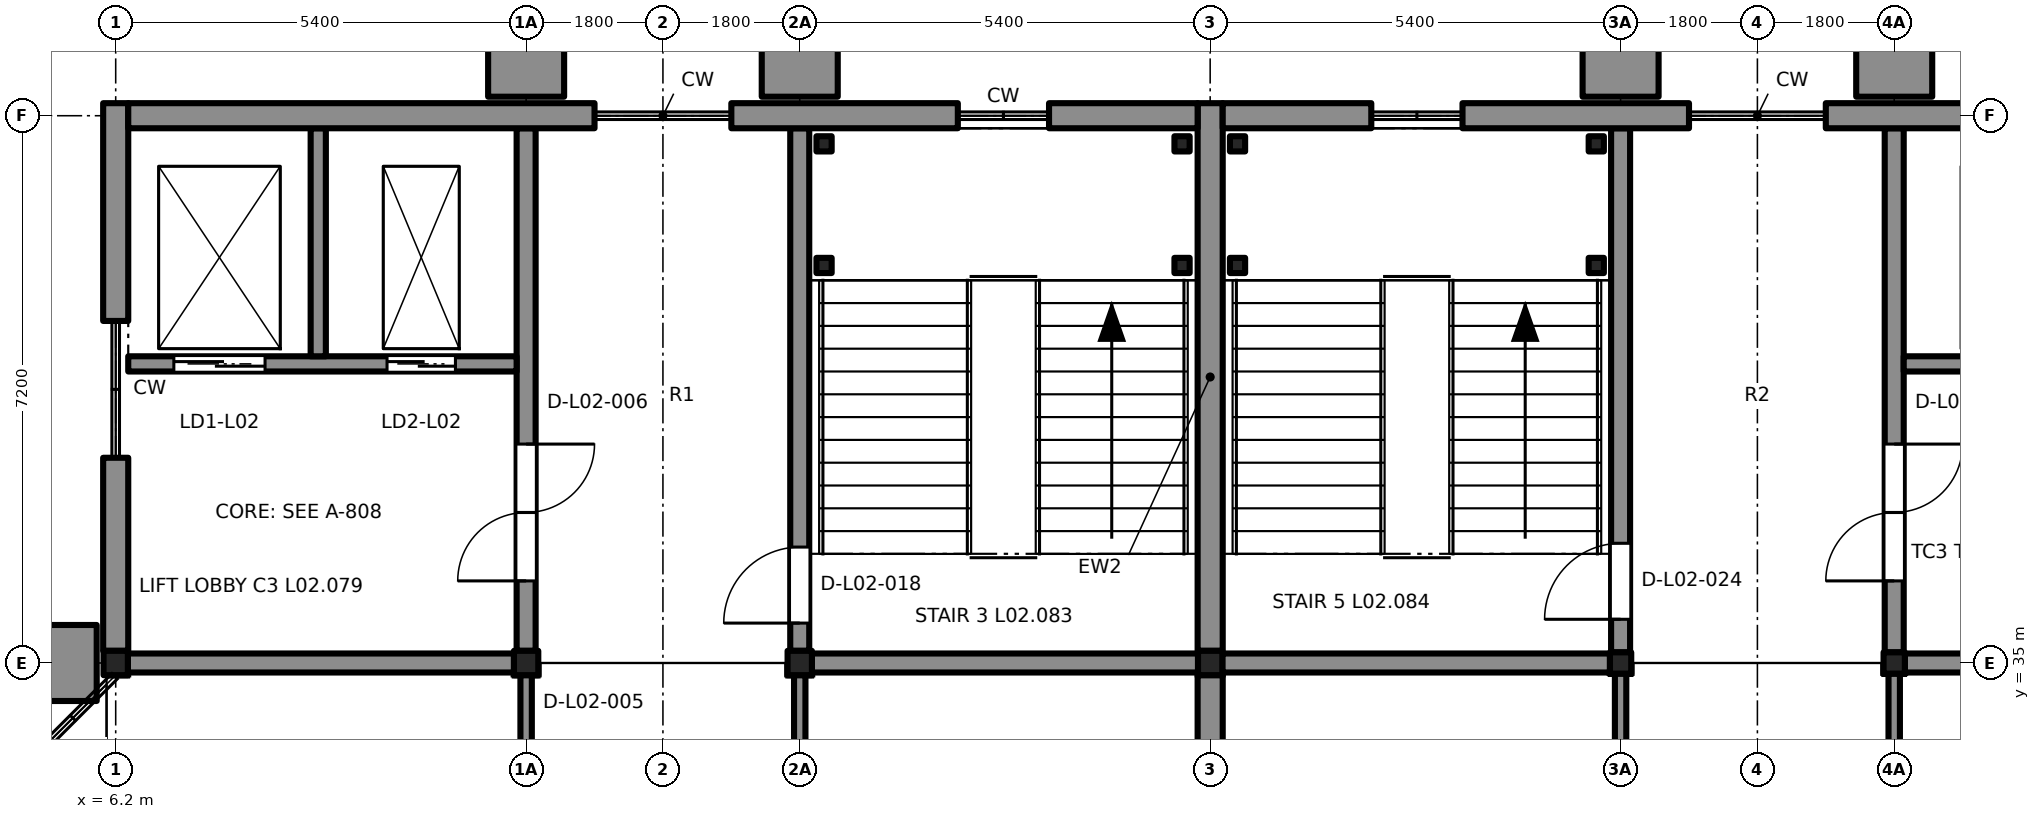
"""IFC4 building model, lengths in metres.
Left out: names, types, materials, properties, quantities, classifications, styles, units other than length and angle.
Written with IfcOpenShell. Run it as: python <this file> out.ifc"""

import sys

from ifc_helpers import new_model, si_unit, direction, frame, frame_2d, origin, origin_2d, place, context, subcontext, project, spatial, rectangle, extrude, element, fill, save


model = new_model("IFC4")
c1 = context("Model", 3, precision=1e-05, world=origin(), true_north=direction((0.0, 1.0)))
c2 = subcontext(c1, "Body", "Model", "MODEL_VIEW")
j1 = project(units=[si_unit("LENGTHUNIT", "METRE"), si_unit("PLANEANGLEUNIT", "RADIAN")], contexts=[c1])
p1 = place(None, origin())
s1 = spatial("IfcSite", under=j1, at=p1, CompositionType="ELEMENT")
p2 = place(p1, origin())
s2 = spatial("IfcBuilding", under=s1, at=p2, CompositionType="ELEMENT")
p3 = place(p2, frame((0.0, 0.0, 10.2)))
s3 = spatial("IfcBuildingStorey", under=s2, at=p3, CompositionType="ELEMENT", Elevation=10.2)
for number, where, z_axis, x_axis in (
    (1, (6.2, 35.0, 0.0), (0.0, 0.0, 1.0), (1.0, 0.0, 0.0)),
    (2, (11.6, 35.0, 0.0), (0.0, 0.0, 1.0), (1.0, 0.0, 0.0)),
    (3, (15.2, 35.0, 0.0), (0.0, 0.0, 1.0), (1.0, 0.0, 0.0)),
    (4, (20.6, 35.0, 0.0), (0.0, 0.0, 1.0), (1.0, 0.0, 0.0)),
):
    element("IfcColumn", number, at=place(p3, frame(where, z_axis=z_axis, x_axis=x_axis)), inside=s3, PredefinedType="COLUMN", context=c2, shape_type="SweptSolid", body=[
        extrude(rectangle(XDim=0.32, YDim=0.32, at=origin_2d()), origin(), (0.0, 0.0, 1.0), 3.9),
    ])
for number, where, z_axis, x_axis in (
    (5, (26.0, 35.0, 0.0), (0.0, 0.0, 1.0), (1.0, 0.0, 0.0)),
    (6, (29.6, 35.0, 0.0), (0.0, 0.0, 1.0), (1.0, 0.0, 0.0)),
):
    element("IfcColumn", number, at=place(p3, frame(where, z_axis=z_axis, x_axis=x_axis)), inside=s3, PredefinedType="COLUMN", context=c2, shape_type="SweptSolid", body=[
        extrude(rectangle(XDim=0.28, YDim=0.28, at=origin_2d()), origin(), (0.0, 0.0, 1.0), 3.9),
    ])
p4 = place(p3, frame((15.2, 35.16, 0.0), z_axis=(0.0, 0.0, 1.0), x_axis=(0.0, 1.0, 0.0)))
e7 = element("IfcWall", 7, at=p4, inside=s3, PredefinedType="SHEAR", context=c2, shape_type="SweptSolid", body=[
    extrude(rectangle(XDim=6.875, YDim=0.25, at=frame_2d((3.438, 0.0))), origin(), (0.0, 0.0, 1.0), 3.65),
])
p5 = place(p4, frame((0.365, 0.0, 0.0)))
e8 = element("IfcOpeningElement", 8, at=p5, cuts=e7, PredefinedType="OPENING", context=c2, shape_type="SweptSolid", body=[
    extrude(rectangle(XDim=1.0, YDim=2.1, at=frame_2d((0.5, 1.05))), frame((0.0, 0.135, 0.0), z_axis=(0.0, -1.0, 0.0), x_axis=(1.0, 0.0, 0.0)), (0.0, 0.0, 1.0), 0.27),
])
p6 = place(p3, frame((15.36, 35.0, 0.0), z_axis=(0.0, 0.0, 1.0), x_axis=(1.0, 0.0, 0.0)))
e9 = element("IfcWall", 9, at=p6, inside=s3, PredefinedType="SHEAR", context=c2, shape_type="SweptSolid", body=[
    extrude(rectangle(XDim=5.08, YDim=0.25, at=frame_2d((2.54, 0.0))), origin(), (0.0, 0.0, 1.0), 3.65),
])
p7 = place(p3, frame((11.6, 35.16, 0.0), z_axis=(0.0, 0.0, 1.0), x_axis=(0.0, 1.0, 0.0)))
e10 = element("IfcWall", 10, at=p7, inside=s3, PredefinedType="SHEAR", context=c2, shape_type="SweptSolid", body=[
    extrude(rectangle(XDim=6.875, YDim=0.25, at=frame_2d((3.438, 0.0))), origin(), (0.0, 0.0, 1.0), 3.65),
])
p8 = place(p7, frame((0.92, 0.0, 0.0)))
e11 = element("IfcOpeningElement", 11, at=p8, cuts=e10, PredefinedType="OPENING", context=c2, shape_type="SweptSolid", body=[
    extrude(rectangle(XDim=1.8, YDim=2.1, at=frame_2d((0.9, 1.05))), frame((0.0, 0.135, 0.0), z_axis=(0.0, -1.0, 0.0), x_axis=(1.0, 0.0, 0.0)), (0.0, 0.0, 1.0), 0.27),
])
p9 = place(p3, frame((6.36, 35.0, 0.0), z_axis=(0.0, 0.0, 1.0), x_axis=(1.0, 0.0, 0.0)))
e12 = element("IfcWall", 12, at=p9, inside=s3, PredefinedType="SHEAR", context=c2, shape_type="SweptSolid", body=[
    extrude(rectangle(XDim=5.08, YDim=0.25, at=frame_2d((2.54, 0.0))), origin(), (0.0, 0.0, 1.0), 3.65),
])
p10 = place(p3, frame((6.365, 38.935, 0.0), z_axis=(0.0, 0.0, 1.0), x_axis=(1.0, 0.0, 0.0)))
e13 = element("IfcWall", 13, at=p10, inside=s3, PredefinedType="SHEAR", context=c2, shape_type="SweptSolid", body=[
    extrude(rectangle(XDim=5.11, YDim=0.2, at=frame_2d((2.555, 0.0))), origin(), (0.0, 0.0, 1.0), 3.65),
])
p11 = place(p10, frame((0.6, 0.0, 0.0)))
e14 = element("IfcOpeningElement", 14, at=p11, cuts=e13, PredefinedType="OPENING", context=c2, shape_type="SweptSolid", body=[
    extrude(rectangle(XDim=1.2, YDim=2.1, at=frame_2d((0.6, 1.05))), frame((0.0, 0.11, 0.0), z_axis=(0.0, -1.0, 0.0), x_axis=(1.0, 0.0, 0.0)), (0.0, 0.0, 1.0), 0.22),
])
p12 = place(p10, frame((3.405, 0.0, 0.0)))
e15 = element("IfcOpeningElement", 15, at=p12, cuts=e13, PredefinedType="OPENING", context=c2, shape_type="SweptSolid", body=[
    extrude(rectangle(XDim=0.9, YDim=2.1, at=frame_2d((0.45, 1.05))), frame((0.0, 0.11, 0.0), z_axis=(0.0, -1.0, 0.0), x_axis=(1.0, 0.0, 0.0)), (0.0, 0.0, 1.0), 0.22),
])
p13 = place(p3, frame((8.865, 42.035, 0.0), z_axis=(0.0, 0.0, 1.0), x_axis=(0.0, -1.0, 0.0)))
e16 = element("IfcWall", 16, at=p13, inside=s3, PredefinedType="SHEAR", context=c2, shape_type="SweptSolid", body=[
    extrude(rectangle(XDim=3.0, YDim=0.2, at=frame_2d((1.5, 0.0))), origin(), (0.0, 0.0, 1.0), 3.65),
])
for number, where, z_axis, x_axis in (
    (17, (15.52, 41.83, 0.0), (0.0, 0.0, 1.0), (1.0, 0.0, 0.0)),
    (18, (20.23, 41.83, 0.0), (0.0, 0.0, 1.0), (1.0, 0.0, 0.0)),
    (19, (15.52, 40.23, 0.0), (0.0, 0.0, 1.0), (1.0, 0.0, 0.0)),
    (20, (20.23, 40.23, 0.0), (0.0, 0.0, 1.0), (1.0, 0.0, 0.0)),
):
    element("IfcColumn", number, at=place(p3, frame(where, z_axis=z_axis, x_axis=x_axis)), inside=s3, PredefinedType="COLUMN", context=c2, shape_type="SweptSolid", body=[
        extrude(rectangle(XDim=0.2, YDim=0.2, at=origin_2d()), origin(), (0.0, 0.0, 1.0), 3.9),
    ])
p14 = place(p3, frame((26.0, 35.14, 0.0), z_axis=(0.0, 0.0, 1.0), x_axis=(0.0, 1.0, 0.0)))
e21 = element("IfcWall", 21, at=p14, inside=s3, PredefinedType="SHEAR", context=c2, shape_type="SweptSolid", body=[
    extrude(rectangle(XDim=6.895, YDim=0.25, at=frame_2d((3.448, 0.0))), origin(), (0.0, 0.0, 1.0), 3.65),
])
p15 = place(p14, frame((0.435, 0.0, 0.0)))
e22 = element("IfcOpeningElement", 22, at=p15, cuts=e21, PredefinedType="OPENING", context=c2, shape_type="SweptSolid", body=[
    extrude(rectangle(XDim=1.0, YDim=2.1, at=frame_2d((0.5, 1.05))), frame((0.0, 0.135, 0.0), z_axis=(0.0, -1.0, 0.0), x_axis=(1.0, 0.0, 0.0)), (0.0, 0.0, 1.0), 0.27),
])
p16 = place(p3, frame((20.76, 35.0, 0.0), z_axis=(0.0, 0.0, 1.0), x_axis=(1.0, 0.0, 0.0)))
e23 = element("IfcWall", 23, at=p16, inside=s3, PredefinedType="SHEAR", context=c2, shape_type="SweptSolid", body=[
    extrude(rectangle(XDim=5.1, YDim=0.25, at=frame_2d((2.55, 0.0))), origin(), (0.0, 0.0, 1.0), 3.65),
])
p17 = place(p3, frame((29.6, 35.14, 0.0), z_axis=(0.0, 0.0, 1.0), x_axis=(0.0, 1.0, 0.0)))
e24 = element("IfcWall", 24, at=p17, inside=s3, PredefinedType="SHEAR", context=c2, shape_type="SweptSolid", body=[
    extrude(rectangle(XDim=6.895, YDim=0.25, at=frame_2d((3.448, 0.0))), origin(), (0.0, 0.0, 1.0), 3.65),
])
p18 = place(p17, frame((0.94, 0.0, 0.0)))
e25 = element("IfcOpeningElement", 25, at=p18, cuts=e24, PredefinedType="OPENING", context=c2, shape_type="SweptSolid", body=[
    extrude(rectangle(XDim=1.8, YDim=2.1, at=frame_2d((0.9, 1.05))), frame((0.0, 0.135, 0.0), z_axis=(0.0, -1.0, 0.0), x_axis=(1.0, 0.0, 0.0)), (0.0, 0.0, 1.0), 0.27),
])
p19 = place(p3, frame((29.74, 35.0, 0.0), z_axis=(0.0, 0.0, 1.0), x_axis=(1.0, 0.0, 0.0)))
e26 = element("IfcWall", 26, at=p19, inside=s3, PredefinedType="SHEAR", context=c2, shape_type="SweptSolid", body=[
    extrude(rectangle(XDim=5.12, YDim=0.25, at=frame_2d((2.56, 0.0))), origin(), (0.0, 0.0, 1.0), 3.65),
])
p20 = place(p3, frame((29.725, 38.935, 0.0), z_axis=(0.0, 0.0, 1.0), x_axis=(1.0, 0.0, 0.0)))
e27 = element("IfcWall", 27, at=p20, inside=s3, PredefinedType="SHEAR", context=c2, shape_type="SweptSolid", body=[
    extrude(rectangle(XDim=5.11, YDim=0.2, at=frame_2d((2.555, 0.0))), origin(), (0.0, 0.0, 1.0), 3.65),
])
p21 = place(p20, frame((3.31, 0.0, 0.0)))
e28 = element("IfcOpeningElement", 28, at=p21, cuts=e27, PredefinedType="OPENING", context=c2, shape_type="SweptSolid", body=[
    extrude(rectangle(XDim=1.2, YDim=2.1, at=frame_2d((0.6, 1.05))), frame((0.0, 0.11, 0.0), z_axis=(0.0, -1.0, 0.0), x_axis=(1.0, 0.0, 0.0)), (0.0, 0.0, 1.0), 0.22),
])
p22 = place(p20, frame((0.805, 0.0, 0.0)))
e29 = element("IfcOpeningElement", 29, at=p22, cuts=e27, PredefinedType="OPENING", context=c2, shape_type="SweptSolid", body=[
    extrude(rectangle(XDim=0.9, YDim=2.1, at=frame_2d((0.45, 1.05))), frame((0.0, 0.11, 0.0), z_axis=(0.0, -1.0, 0.0), x_axis=(1.0, 0.0, 0.0)), (0.0, 0.0, 1.0), 0.22),
])
for number, where, z_axis, x_axis in (
    (30, (20.96, 41.83, 0.0), (0.0, 0.0, 1.0), (1.0, 0.0, 0.0)),
    (31, (25.68, 41.83, 0.0), (0.0, 0.0, 1.0), (1.0, 0.0, 0.0)),
    (32, (20.96, 40.23, 0.0), (0.0, 0.0, 1.0), (1.0, 0.0, 0.0)),
    (33, (25.68, 40.23, 0.0), (0.0, 0.0, 1.0), (1.0, 0.0, 0.0)),
):
    element("IfcColumn", number, at=place(p3, frame(where, z_axis=z_axis, x_axis=x_axis)), inside=s3, PredefinedType="COLUMN", context=c2, shape_type="SweptSolid", body=[
        extrude(rectangle(XDim=0.2, YDim=0.2, at=origin_2d()), origin(), (0.0, 0.0, 1.0), 1.75),
    ])
p23 = place(p3, frame((6.2, 35.16, 0.0), z_axis=(0.0, 0.0, 1.0), x_axis=(0.0, 1.0, 0.0)))
e34 = element("IfcWall", 34, at=p23, inside=s3, PredefinedType="SOLIDWALL", context=c2, shape_type="SweptSolid", body=[
    extrude(rectangle(XDim=2.54, YDim=0.33, at=frame_2d((1.27, 0.0))), origin(), (0.0, 0.0, 1.0), 3.22),
])
p24 = place(p3, frame((6.2, 39.5, 0.0), z_axis=(0.0, 0.0, 1.0), x_axis=(0.0, 1.0, 0.0)))
e35 = element("IfcWall", 35, at=p24, inside=s3, PredefinedType="SOLIDWALL", context=c2, shape_type="SweptSolid", body=[
    extrude(rectangle(XDim=2.865, YDim=0.33, at=frame_2d((1.433, 0.0))), origin(), (0.0, 0.0, 1.0), 3.22),
])
p25 = place(p3, frame((5.575, 34.5, 0.0), z_axis=(0.0, 0.0, 1.0), x_axis=(0.0, 1.0, 0.0)))
e36 = element("IfcWall", 36, at=p25, inside=s3, PredefinedType="SOLIDWALL", context=c2, shape_type="SweptSolid", body=[
    extrude(rectangle(XDim=1.0, YDim=0.75, at=frame_2d((0.5, 0.0))), origin(), (0.0, 0.0, 1.0), 3.9),
])
p26 = place(p3, frame((20.6, 34.84, 0.0), z_axis=(0.0, 0.0, 1.0), x_axis=(0.0, -1.0, 0.0)))
e37 = element("IfcWall", 37, at=p26, inside=s3, PredefinedType="SOLIDWALL", context=c2, shape_type="SweptSolid", body=[
    extrude(rectangle(XDim=6.88, YDim=0.33, at=frame_2d((3.44, 0.0))), origin(), (0.0, 0.0, 1.0), 3.22),
])
p27 = place(p3, frame((20.6, 42.365, 0.0), z_axis=(0.0, 0.0, 1.0), x_axis=(0.0, -1.0, 0.0)))
e38 = element("IfcWall", 38, at=p27, inside=s3, PredefinedType="SOLIDWALL", context=c2, shape_type="SweptSolid", body=[
    extrude(rectangle(XDim=7.205, YDim=0.33, at=frame_2d((3.603, 0.0))), origin(), (0.0, 0.0, 1.0), 3.22),
])
p28 = place(p3, frame((6.365, 42.2, 0.0), z_axis=(0.0, 0.0, 1.0), x_axis=(1.0, 0.0, 0.0)))
e39 = element("IfcWall", 39, at=p28, inside=s3, PredefinedType="SOLIDWALL", context=c2, shape_type="SweptSolid", body=[
    extrude(rectangle(XDim=6.135, YDim=0.33, at=frame_2d((3.067, 0.0))), origin(), (0.0, 0.0, 1.0), 3.2),
])
p29 = place(p3, frame((14.3, 42.2, 0.0), z_axis=(0.0, 0.0, 1.0), x_axis=(1.0, 0.0, 0.0)))
e40 = element("IfcWall", 40, at=p29, inside=s3, PredefinedType="SOLIDWALL", context=c2, shape_type="SweptSolid", body=[
    extrude(rectangle(XDim=2.98, YDim=0.33, at=frame_2d((1.49, 0.0))), origin(), (0.0, 0.0, 1.0), 3.2),
])
p30 = place(p3, frame((18.48, 42.2, 0.0), z_axis=(0.0, 0.0, 1.0), x_axis=(1.0, 0.0, 0.0)))
e41 = element("IfcWall", 41, at=p30, inside=s3, PredefinedType="SOLIDWALL", context=c2, shape_type="SweptSolid", body=[
    extrude(rectangle(XDim=1.955, YDim=0.33, at=frame_2d((0.978, 0.0))), origin(), (0.0, 0.0, 1.0), 3.2),
])
for number, where, z_axis, x_axis in (
    (42, (11.1, 42.825, 0.0), (0.0, 0.0, 1.0), (1.0, 0.0, 0.0)),
    (43, (14.7, 42.825, 0.0), (0.0, 0.0, 1.0), (1.0, 0.0, 0.0)),
):
    element("IfcWall", number, at=place(p3, frame(where, z_axis=z_axis, x_axis=x_axis)), inside=s3, PredefinedType="SOLIDWALL", context=c2, shape_type="SweptSolid", body=[
        extrude(rectangle(XDim=1.0, YDim=0.75, at=frame_2d((0.5, 0.0))), origin(), (0.0, 0.0, 1.0), 3.9),
    ])
p31 = place(p3, frame((20.765, 42.2, 0.0), z_axis=(0.0, 0.0, 1.0), x_axis=(1.0, 0.0, 0.0)))
e44 = element("IfcWall", 44, at=p31, inside=s3, PredefinedType="SOLIDWALL", context=c2, shape_type="SweptSolid", body=[
    extrude(rectangle(XDim=1.955, YDim=0.33, at=frame_2d((0.978, 0.0))), origin(), (0.0, 0.0, 1.0), 3.2),
])
p32 = place(p3, frame((23.92, 42.2, 0.0), z_axis=(0.0, 0.0, 1.0), x_axis=(1.0, 0.0, 0.0)))
e45 = element("IfcWall", 45, at=p32, inside=s3, PredefinedType="SOLIDWALL", context=c2, shape_type="SweptSolid", body=[
    extrude(rectangle(XDim=2.98, YDim=0.33, at=frame_2d((1.49, 0.0))), origin(), (0.0, 0.0, 1.0), 3.2),
])
p33 = place(p3, frame((28.7, 42.2, 0.0), z_axis=(0.0, 0.0, 1.0), x_axis=(1.0, 0.0, 0.0)))
e46 = element("IfcWall", 46, at=p33, inside=s3, PredefinedType="SOLIDWALL", context=c2, shape_type="SweptSolid", body=[
    extrude(rectangle(XDim=6.135, YDim=0.33, at=frame_2d((3.067, 0.0))), origin(), (0.0, 0.0, 1.0), 3.2),
])
for number, where, z_axis, x_axis in (
    (47, (25.5, 42.825, 0.0), (0.0, 0.0, 1.0), (1.0, 0.0, 0.0)),
    (48, (29.1, 42.825, 0.0), (0.0, 0.0, 1.0), (1.0, 0.0, 0.0)),
):
    element("IfcWall", number, at=place(p3, frame(where, z_axis=z_axis, x_axis=x_axis)), inside=s3, PredefinedType="SOLIDWALL", context=c2, shape_type="SweptSolid", body=[
        extrude(rectangle(XDim=1.0, YDim=0.75, at=frame_2d((0.5, 0.0))), origin(), (0.0, 0.0, 1.0), 3.9),
    ])
p34 = place(p3, frame((11.6, 31.4, 0.0), z_axis=(0.0, 0.0, 1.0), x_axis=(0.0, 1.0, 0.0)))
e49 = element("IfcWall", 49, at=p34, inside=s3, PredefinedType="PARTITIONING", context=c2, shape_type="SweptSolid", body=[
    extrude(rectangle(XDim=3.44, YDim=0.15, at=frame_2d((1.72, 0.0))), origin(), (0.0, 0.0, 1.0), 3.22),
])
p35 = place(p34, frame((1.05, 0.0, 0.0)))
e50 = element("IfcOpeningElement", 50, at=p35, cuts=e49, PredefinedType="OPENING", context=c2, shape_type="SweptSolid", body=[
    extrude(rectangle(XDim=1.5, YDim=2.1, at=frame_2d((0.75, 1.05))), frame((0.0, 0.085, 0.0), z_axis=(0.0, -1.0, 0.0), x_axis=(1.0, 0.0, 0.0)), (0.0, 0.0, 1.0), 0.17),
])
p36 = place(p3, frame((15.2, 34.84, 0.0), z_axis=(0.0, 0.0, 1.0), x_axis=(0.0, -1.0, 0.0)))
e51 = element("IfcWall", 51, at=p36, inside=s3, PredefinedType="PARTITIONING", context=c2, shape_type="SweptSolid", body=[
    extrude(rectangle(XDim=6.88, YDim=0.15, at=frame_2d((3.44, 0.0))), origin(), (0.0, 0.0, 1.0), 3.22),
])
p37 = place(p36, frame((4.74, 0.0, 0.0)))
e52 = element("IfcOpeningElement", 52, at=p37, cuts=e51, PredefinedType="OPENING", context=c2, shape_type="SweptSolid", body=[
    extrude(rectangle(XDim=1.0, YDim=2.1, at=frame_2d((0.5, 1.05))), frame((0.0, 0.085, 0.0), z_axis=(0.0, -1.0, 0.0), x_axis=(1.0, 0.0, 0.0)), (0.0, 0.0, 1.0), 0.17),
])
p38 = place(p3, frame((26.0, 27.94, 0.0), z_axis=(0.0, 0.0, 1.0), x_axis=(0.0, 1.0, 0.0)))
e53 = element("IfcWall", 53, at=p38, inside=s3, PredefinedType="PARTITIONING", context=c2, shape_type="SweptSolid", body=[
    extrude(rectangle(XDim=6.92, YDim=0.15, at=frame_2d((3.46, 0.0))), origin(), (0.0, 0.0, 1.0), 3.22),
])
p39 = place(p38, frame((1.16, 0.0, 0.0)))
e54 = element("IfcOpeningElement", 54, at=p39, cuts=e53, PredefinedType="OPENING", context=c2, shape_type="SweptSolid", body=[
    extrude(rectangle(XDim=1.0, YDim=2.1, at=frame_2d((0.5, 1.05))), frame((0.0, 0.085, 0.0), z_axis=(0.0, -1.0, 0.0), x_axis=(1.0, 0.0, 0.0)), (0.0, 0.0, 1.0), 0.17),
])
p40 = place(p3, frame((29.6, 34.86, 0.0), z_axis=(0.0, 0.0, 1.0), x_axis=(0.0, -1.0, 0.0)))
e55 = element("IfcWall", 55, at=p40, inside=s3, PredefinedType="PARTITIONING", context=c2, shape_type="SweptSolid", body=[
    extrude(rectangle(XDim=3.46, YDim=0.15, at=frame_2d((1.73, 0.0))), origin(), (0.0, 0.0, 1.0), 3.22),
])
p41 = place(p40, frame((1.16, 0.0, 0.0)))
e56 = element("IfcOpeningElement", 56, at=p41, cuts=e55, PredefinedType="OPENING", context=c2, shape_type="SweptSolid", body=[
    extrude(rectangle(XDim=1.0, YDim=2.1, at=frame_2d((0.5, 1.05))), frame((0.0, 0.085, 0.0), z_axis=(0.0, -1.0, 0.0), x_axis=(1.0, 0.0, 0.0)), (0.0, 0.0, 1.0), 0.17),
])
p42 = place(p5, origin())
e57 = element("IfcDoor", 57, at=p42, inside=s3, OperationType="SINGLE_SWING_LEFT", PredefinedType="DOOR", context=c2, shape_type="SweptSolid", body=[
    extrude(rectangle(XDim=1.0, YDim=2.1, at=frame_2d((0.5, 1.05))), frame((0.0, 0.025, 0.0), z_axis=(0.0, -1.0, 0.0), x_axis=(1.0, 0.0, 0.0)), (0.0, 0.0, 1.0), 0.05),
])
fill(e8, e57)
p43 = place(p8, origin())
e58 = element("IfcDoor", 58, at=p43, inside=s3, OperationType="DOUBLE_DOOR_SINGLE_SWING", PredefinedType="DOOR", context=c2, shape_type="SweptSolid", body=[
    extrude(rectangle(XDim=1.8, YDim=2.1, at=frame_2d((0.9, 1.05))), frame((0.0, 0.025, 0.0), z_axis=(0.0, -1.0, 0.0), x_axis=(1.0, 0.0, 0.0)), (0.0, 0.0, 1.0), 0.05),
])
fill(e11, e58)
p44 = place(p11, origin())
e59 = element("IfcDoor", 59, at=p44, inside=s3, OperationType="DOUBLE_DOOR_SLIDING", PredefinedType="DOOR", context=c2, shape_type="SweptSolid", body=[
    extrude(rectangle(XDim=1.2, YDim=2.1, at=frame_2d((0.6, 1.05))), frame((0.0, 0.025, 0.0), z_axis=(0.0, -1.0, 0.0), x_axis=(1.0, 0.0, 0.0)), (0.0, 0.0, 1.0), 0.05),
])
fill(e14, e59)
p45 = place(p12, origin())
e60 = element("IfcDoor", 60, at=p45, inside=s3, OperationType="DOUBLE_DOOR_SLIDING", PredefinedType="DOOR", context=c2, shape_type="SweptSolid", body=[
    extrude(rectangle(XDim=0.9, YDim=2.1, at=frame_2d((0.45, 1.05))), frame((0.0, 0.025, 0.0), z_axis=(0.0, -1.0, 0.0), x_axis=(1.0, 0.0, 0.0)), (0.0, 0.0, 1.0), 0.05),
])
fill(e15, e60)
p46 = place(p15, origin())
e61 = element("IfcDoor", 61, at=p46, inside=s3, OperationType="SINGLE_SWING_LEFT", PredefinedType="DOOR", context=c2, shape_type="SweptSolid", body=[
    extrude(rectangle(XDim=1.0, YDim=2.1, at=frame_2d((0.5, 1.05))), frame((0.0, 0.025, 0.0), z_axis=(0.0, -1.0, 0.0), x_axis=(1.0, 0.0, 0.0)), (0.0, 0.0, 1.0), 0.05),
])
fill(e22, e61)
p47 = place(p18, origin())
e62 = element("IfcDoor", 62, at=p47, inside=s3, OperationType="DOUBLE_DOOR_SINGLE_SWING", PredefinedType="DOOR", context=c2, shape_type="SweptSolid", body=[
    extrude(rectangle(XDim=1.8, YDim=2.1, at=frame_2d((0.9, 1.05))), frame((0.0, 0.025, 0.0), z_axis=(0.0, -1.0, 0.0), x_axis=(1.0, 0.0, 0.0)), (0.0, 0.0, 1.0), 0.05),
])
fill(e25, e62)
save(model, sys.argv[1])
